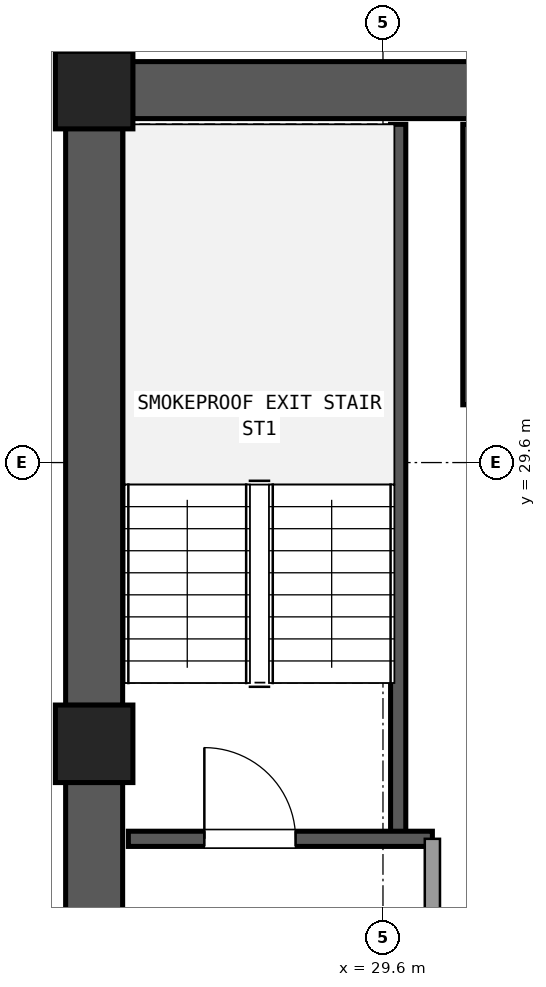
"""IFC4 building model, lengths in metres.
Left out: names, types, materials, properties, quantities, classifications, styles, units other than length and angle.
Written with IfcOpenShell. Run it as: python <this file> out.ifc"""

import sys

from ifc_helpers import new_model, si_unit, direction, frame, frame_2d, origin, origin_2d, place, context, subcontext, project, spatial, rectangle, extrude, element, fill, save


model = new_model("IFC4")
c1 = context("Model", 3, precision=1e-05, world=origin(), true_north=direction((0.0, 1.0)))
c2 = subcontext(c1, "Body", "Model", "MODEL_VIEW")
j1 = project(units=[si_unit("LENGTHUNIT", "METRE"), si_unit("PLANEANGLEUNIT", "RADIAN")], contexts=[c1])
p1 = place(None, origin())
s1 = spatial("IfcSite", under=j1, at=p1, CompositionType="ELEMENT")
p2 = place(p1, origin())
s2 = spatial("IfcBuilding", under=s1, at=p2, CompositionType="ELEMENT")
p3 = place(p2, frame((0.0, 0.0, 91.98)))
s3 = spatial("IfcBuildingStorey", under=s2, at=p3, CompositionType="ELEMENT", Elevation=91.98)
for number, where, z_axis, x_axis in (
    (1, (25.8, 34.5, 0.0), (0.0, 0.0, 1.0), (1.0, 0.0, 0.0)),
    (2, (25.8, 25.9, 0.0), (0.0, 0.0, 1.0), (1.0, 0.0, 0.0)),
):
    element("IfcColumn", number, at=place(p3, frame(where, z_axis=z_axis, x_axis=x_axis)), inside=s3, PredefinedType="COLUMN", context=c2, shape_type="SweptSolid", body=[
        extrude(rectangle(XDim=1.02, YDim=1.02, at=origin_2d()), origin(), (0.0, 0.0, 1.0), 3.6),
    ])
p4 = place(p3, frame((36.495, 34.5, 0.0), z_axis=(0.0, 0.0, 1.0), x_axis=(-1.0, 0.0, 0.0)))
e3 = element("IfcWall", 3, at=p4, inside=s3, PredefinedType="SHEAR", context=c2, shape_type="SweptSolid", body=[
    extrude(rectangle(XDim=10.19, YDim=0.75, at=frame_2d((5.095, 0.0))), origin(), (0.0, 0.0, 1.0), 3.32),
])
p5 = place(p4, frame((4.095, 0.0, 0.0)))
e4 = element("IfcOpeningElement", 4, at=p5, cuts=e3, PredefinedType="OPENING", context=c2, shape_type="SweptSolid", body=[
    extrude(rectangle(XDim=1.2, YDim=2.15, at=frame_2d((0.6, 1.075))), frame((0.0, 0.385, 0.0), z_axis=(0.0, -1.0, 0.0), x_axis=(1.0, 0.0, 0.0)), (0.0, 0.0, 1.0), 0.77),
])
p6 = place(p3, frame((25.8, 33.995, 0.0), z_axis=(0.0, 0.0, 1.0), x_axis=(0.0, -1.0, 0.0)))
e5 = element("IfcWall", 5, at=p6, inside=s3, PredefinedType="SHEAR", context=c2, shape_type="SweptSolid", body=[
    extrude(rectangle(XDim=7.59, YDim=0.75, at=frame_2d((3.795, 0.0))), origin(), (0.0, 0.0, 1.0), 3.32),
])
p7 = place(p3, frame((25.8, 25.395, 0.0), z_axis=(0.0, 0.0, 1.0), x_axis=(0.0, -1.0, 0.0)))
e6 = element("IfcWall", 6, at=p7, inside=s3, PredefinedType="SHEAR", context=c2, shape_type="SweptSolid", body=[
    extrude(rectangle(XDim=7.59, YDim=0.75, at=frame_2d((3.795, 0.0))), origin(), (0.0, 0.0, 1.0), 3.32),
])
p8 = place(p7, frame((2.145, 0.0, 0.0)))
e7 = element("IfcOpeningElement", 7, at=p8, cuts=e6, PredefinedType="OPENING", context=c2, shape_type="SweptSolid", body=[
    extrude(rectangle(XDim=1.2, YDim=2.15, at=frame_2d((0.6, 1.075))), frame((0.0, 0.385, 0.0), z_axis=(0.0, -1.0, 0.0), x_axis=(1.0, 0.0, 0.0)), (0.0, 0.0, 1.0), 0.77),
])
p9 = place(p3, frame((29.8, 24.65, 0.0), z_axis=(0.0, 0.0, 1.0), x_axis=(0.0, 1.0, 0.0)))
e8 = element("IfcWall", 8, at=p9, inside=s3, PredefinedType="SHEAR", context=c2, shape_type="SweptSolid", body=[
    extrude(rectangle(XDim=9.4, YDim=0.2, at=frame_2d((4.7, 0.0))), origin(), (0.0, 0.0, 1.0), 3.32),
])
p10 = place(p3, frame((26.25, 24.65, 0.0), z_axis=(0.0, 0.0, 1.0), x_axis=(1.0, 0.0, 0.0)))
e9 = element("IfcWall", 9, at=p10, inside=s3, PredefinedType="SHEAR", context=c2, shape_type="SweptSolid", body=[
    extrude(rectangle(XDim=4.0, YDim=0.2, at=frame_2d((2.0, 0.0))), origin(), (0.0, 0.0, 1.0), 3.32),
])
p11 = place(p10, frame((1.0, 0.0, 0.0)))
e10 = element("IfcOpeningElement", 10, at=p11, cuts=e9, PredefinedType="OPENING", context=c2, shape_type="SweptSolid", body=[
    extrude(rectangle(XDim=1.2, YDim=2.15, at=frame_2d((0.6, 1.075))), frame((0.0, 0.11, 0.0), z_axis=(0.0, -1.0, 0.0), x_axis=(1.0, 0.0, 0.0)), (0.0, 0.0, 1.0), 0.22),
])
p12 = place(p3, frame((30.75, 30.36, 0.0), z_axis=(0.0, 0.0, 1.0), x_axis=(0.0, 1.0, 0.0)))
e11 = element("IfcWall", 11, at=p12, inside=s3, PredefinedType="SHEAR", context=c2, shape_type="SweptSolid", body=[
    extrude(rectangle(XDim=3.69, YDim=0.2, at=frame_2d((1.845, 0.0))), origin(), (0.0, 0.0, 1.0), 3.32),
])
p13 = place(p3, frame((30.25, 17.75, 0.0), z_axis=(0.0, 0.0, 1.0), x_axis=(0.0, 1.0, 0.0)))
e12 = element("IfcWall", 12, at=p13, inside=s3, PredefinedType="SOLIDWALL", context=c2, shape_type="SweptSolid", body=[
    extrude(rectangle(XDim=6.9, YDim=0.2, at=frame_2d((3.45, 0.0))), origin(), (0.0, 0.0, 1.0), 2.61),
])
p14 = place(p13, frame((4.15, 0.0, 0.0)))
e13 = element("IfcOpeningElement", 13, at=p14, cuts=e12, PredefinedType="OPENING", context=c2, shape_type="SweptSolid", body=[
    extrude(rectangle(XDim=1.2, YDim=2.15, at=frame_2d((0.6, 1.075))), frame((0.0, 0.11, 0.0), z_axis=(0.0, -1.0, 0.0), x_axis=(1.0, 0.0, 0.0)), (0.0, 0.0, 1.0), 0.22),
])
p15 = place(p11, origin())
e14 = element("IfcDoor", 14, at=p15, inside=s3, OperationType="SINGLE_SWING_LEFT", PredefinedType="DOOR", context=c2, shape_type="SweptSolid", body=[
    extrude(rectangle(XDim=1.2, YDim=2.15, at=frame_2d((0.6, 1.075))), frame((0.0, 0.025, 0.0), z_axis=(0.0, -1.0, 0.0), x_axis=(1.0, 0.0, 0.0)), (0.0, 0.0, 1.0), 0.05),
])
fill(e10, e14)
save(model, sys.argv[1])
